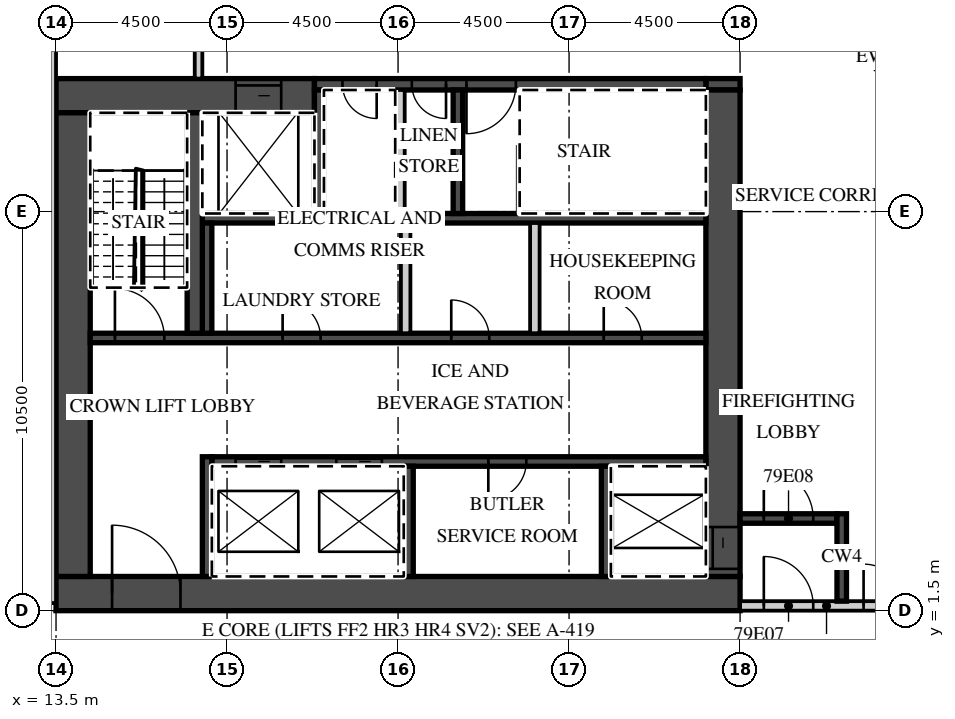
"""IFC4 building model, lengths in metres.
Left out: names, types, materials, properties, quantities, classifications, styles, units other than length and angle.
Written with IfcOpenShell. Run it as: python <this file> out.ifc"""

import sys

from ifc_helpers import new_model, si_unit, direction, frame, frame_2d, origin, place, context, subcontext, project, spatial, polyline, rectangle, outline, extrude, element, fill, save


model = new_model("IFC4")
c1 = context("Model", 3, precision=1e-05, world=origin(), true_north=direction((0.0, 1.0)))
c2 = subcontext(c1, "Body", "Model", "MODEL_VIEW")
j1 = project(units=[si_unit("LENGTHUNIT", "METRE"), si_unit("PLANEANGLEUNIT", "RADIAN")], contexts=[c1])
p1 = place(None, origin())
s1 = spatial("IfcSite", under=j1, at=p1, CompositionType="ELEMENT")
p2 = place(p1, origin())
s2 = spatial("IfcBuilding", under=s1, at=p2, CompositionType="ELEMENT")
p3 = place(p2, frame((0.0, 0.0, 313.6)))
s3 = spatial("IfcBuildingStorey", under=s2, at=p3, CompositionType="ELEMENT", Elevation=313.6)
p4 = place(p3, frame((35.805, 15.341, 0.0), z_axis=(0.0, 0.0, 1.0), x_axis=(-0.707106781187, 0.707106781187, 0.0)))
e1 = element("IfcWall", 1, at=p4, inside=s3, PredefinedType="SOLIDWALL", context=c2, shape_type="SweptSolid", body=[
    extrude(outline(polyline([(0.0, -0.225), (2.071, -0.225), (1.95, 0.225), (0.121, 0.225), (0.0, -0.225)])), origin(), (0.0, 0.0, 1.0), 3.8),
])
p5 = place(p3, frame((13.5, 1.95, 0.0), z_axis=(0.0, 0.0, 1.0), x_axis=(1.0, 0.0, 0.0)))
e2 = element("IfcWall", 2, at=p5, inside=s3, PredefinedType="SHEAR", context=c2, shape_type="SweptSolid", body=[
    extrude(rectangle(XDim=18.0, YDim=0.9, at=frame_2d((9.0, 0.0))), origin(), (0.0, 0.0, 1.0), 3.8),
])
p6 = place(p5, frame((1.475, 0.0, 0.0)))
e3 = element("IfcOpeningElement", 3, at=p6, cuts=e2, PredefinedType="OPENING", context=c2, shape_type="SweptSolid", body=[
    extrude(rectangle(XDim=1.8, YDim=2.1, at=frame_2d((0.9, 1.05))), frame((0.0, 0.46, 0.0), z_axis=(0.0, -1.0, 0.0), x_axis=(1.0, 0.0, 0.0)), (0.0, 0.0, 1.0), 0.92),
])
p7 = place(p3, frame((13.5, 15.05, 0.0), z_axis=(0.0, 0.0, 1.0), x_axis=(1.0, 0.0, 0.0)))
e4 = element("IfcWall", 4, at=p7, inside=s3, PredefinedType="SHEAR", context=c2, shape_type="SweptSolid", body=[
    extrude(rectangle(XDim=6.8, YDim=0.9, at=frame_2d((3.4, 0.0))), origin(), (0.0, 0.0, 1.0), 3.8),
])
p8 = place(p7, frame((4.725, 0.0, 0.0)))
e5 = element("IfcOpeningElement", 5, at=p8, cuts=e4, PredefinedType="OPENING", context=c2, shape_type="SweptSolid", body=[
    extrude(rectangle(XDim=1.2, YDim=2.1, at=frame_2d((0.6, 1.05))), frame((0.0, 0.46, 0.0), z_axis=(0.0, -1.0, 0.0), x_axis=(1.0, 0.0, 0.0)), (0.0, 0.0, 1.0), 0.92),
])
p9 = place(p3, frame((30.6, 15.35, 0.0), z_axis=(0.0, 0.0, 1.0), x_axis=(1.0, 0.0, 0.0)))
e6 = element("IfcWall", 6, at=p9, inside=s3, PredefinedType="SHEAR", context=c2, shape_type="SweptSolid", body=[
    extrude(rectangle(XDim=0.9, YDim=0.3, at=frame_2d((0.45, 0.0))), origin(), (0.0, 0.0, 1.0), 3.8),
])
p10 = place(p3, frame((20.3, 15.35, 0.0), z_axis=(0.0, 0.0, 1.0), x_axis=(1.0, 0.0, 0.0)))
e7 = element("IfcWall", 7, at=p10, inside=s3, PredefinedType="SHEAR", context=c2, shape_type="SweptSolid", body=[
    extrude(rectangle(XDim=10.3, YDim=0.3, at=frame_2d((5.15, 0.0))), origin(), (0.0, 0.0, 1.0), 3.8),
])
p11 = place(p10, frame((4.0, 0.0, 0.0)))
e8 = element("IfcOpeningElement", 8, at=p11, cuts=e7, PredefinedType="OPENING", context=c2, shape_type="SweptSolid", body=[
    extrude(rectangle(XDim=1.3, YDim=2.1, at=frame_2d((0.65, 1.05))), frame((0.0, 0.16, 0.0), z_axis=(0.0, -1.0, 0.0), x_axis=(1.0, 0.0, 0.0)), (0.0, 0.0, 1.0), 0.32),
])
p12 = place(p10, frame((2.562, 0.0, 0.0)))
e9 = element("IfcOpeningElement", 9, at=p12, cuts=e7, PredefinedType="OPENING", context=c2, shape_type="SweptSolid", body=[
    extrude(rectangle(XDim=0.9, YDim=2.1, at=frame_2d((0.45, 1.05))), frame((0.0, 0.16, 0.0), z_axis=(0.0, -1.0, 0.0), x_axis=(1.0, 0.0, 0.0)), (0.0, 0.0, 1.0), 0.32),
])
p13 = place(p10, frame((0.738, 0.0, 0.0)))
e10 = element("IfcOpeningElement", 10, at=p13, cuts=e7, PredefinedType="OPENING", context=c2, shape_type="SweptSolid", body=[
    extrude(rectangle(XDim=0.9, YDim=2.1, at=frame_2d((0.45, 1.05))), frame((0.0, 0.16, 0.0), z_axis=(0.0, -1.0, 0.0), x_axis=(1.0, 0.0, 0.0)), (0.0, 0.0, 1.0), 0.32),
])
p14 = place(p3, frame((31.05, 2.4, 0.0), z_axis=(0.0, 0.0, 1.0), x_axis=(0.0, 1.0, 0.0)))
e11 = element("IfcWall", 11, at=p14, inside=s3, PredefinedType="SHEAR", context=c2, shape_type="SweptSolid", body=[
    extrude(rectangle(XDim=12.8, YDim=0.9, at=frame_2d((6.4, 0.0))), origin(), (0.0, 0.0, 1.0), 3.8),
])
p15 = place(p14, frame((0.2, 0.0, 0.0)))
e12 = element("IfcOpeningElement", 12, at=p15, cuts=e11, PredefinedType="OPENING", context=c2, shape_type="SweptSolid", body=[
    extrude(rectangle(XDim=1.1, YDim=2.1, at=frame_2d((0.55, 1.05))), frame((0.0, 0.46, 0.0), z_axis=(0.0, -1.0, 0.0), x_axis=(1.0, 0.0, 0.0)), (0.0, 0.0, 1.0), 0.92),
])
p16 = place(p3, frame((13.95, 2.4, 0.0), z_axis=(0.0, 0.0, 1.0), x_axis=(0.0, 1.0, 0.0)))
e13 = element("IfcWall", 13, at=p16, inside=s3, PredefinedType="SHEAR", context=c2, shape_type="SweptSolid", body=[
    extrude(rectangle(XDim=12.2, YDim=0.9, at=frame_2d((6.1, 0.0))), origin(), (0.0, 0.0, 1.0), 3.8),
])
p17 = place(p3, frame((17.6, 5.425, 0.0), z_axis=(0.0, 0.0, 1.0), x_axis=(1.0, 0.0, 0.0)))
e14 = element("IfcWall", 14, at=p17, inside=s3, PredefinedType="SHEAR", context=c2, shape_type="SweptSolid", body=[
    extrude(rectangle(XDim=13.0, YDim=0.25, at=frame_2d((6.5, 0.0))), origin(), (0.0, 0.0, 1.0), 3.8),
])
p18 = place(p17, frame((3.275, 0.0, 0.0)))
e15 = element("IfcOpeningElement", 15, at=p18, cuts=e14, PredefinedType="OPENING", context=c2, shape_type="SweptSolid", body=[
    extrude(rectangle(XDim=1.2, YDim=2.1, at=frame_2d((0.6, 1.05))), frame((0.0, 0.135, 0.0), z_axis=(0.0, -1.0, 0.0), x_axis=(1.0, 0.0, 0.0)), (0.0, 0.0, 1.0), 0.27),
])
p19 = place(p17, frame((0.625, 0.0, 0.0)))
e16 = element("IfcOpeningElement", 16, at=p19, cuts=e14, PredefinedType="OPENING", context=c2, shape_type="SweptSolid", body=[
    extrude(rectangle(XDim=1.2, YDim=2.1, at=frame_2d((0.6, 1.05))), frame((0.0, 0.135, 0.0), z_axis=(0.0, -1.0, 0.0), x_axis=(1.0, 0.0, 0.0)), (0.0, 0.0, 1.0), 0.27),
])
p20 = place(p17, frame((7.275, 0.0, 0.0)))
e17 = element("IfcOpeningElement", 17, at=p20, cuts=e14, PredefinedType="OPENING", context=c2, shape_type="SweptSolid", body=[
    extrude(rectangle(XDim=1.0, YDim=2.1, at=frame_2d((0.5, 1.05))), frame((0.0, 0.135, 0.0), z_axis=(0.0, -1.0, 0.0), x_axis=(1.0, 0.0, 0.0)), (0.0, 0.0, 1.0), 0.27),
])
p21 = place(p3, frame((17.475, 2.4, 0.0), z_axis=(0.0, 0.0, 1.0), x_axis=(0.0, 1.0, 0.0)))
e18 = element("IfcWall", 18, at=p21, inside=s3, PredefinedType="SHEAR", context=c2, shape_type="SweptSolid", body=[
    extrude(rectangle(XDim=3.15, YDim=0.25, at=frame_2d((1.575, 0.0))), origin(), (0.0, 0.0, 1.0), 3.8),
])
for number, where, z_axis, x_axis in (
    (19, (27.975, 2.4, 0.0), (0.0, 0.0, 1.0), (0.0, 1.0, 0.0)),
    (20, (22.775, 2.4, 0.0), (0.0, 0.0, 1.0), (0.0, 1.0, 0.0)),
):
    element("IfcWall", number, at=place(p3, frame(where, z_axis=z_axis, x_axis=x_axis)), inside=s3, PredefinedType="SHEAR", context=c2, shape_type="SweptSolid", body=[
        extrude(rectangle(XDim=2.9, YDim=0.25, at=frame_2d((1.45, 0.0))), origin(), (0.0, 0.0, 1.0), 3.8),
    ])
p22 = place(p3, frame((14.4, 8.675, 0.0), z_axis=(0.0, 0.0, 1.0), x_axis=(1.0, 0.0, 0.0)))
e21 = element("IfcWall", 21, at=p22, inside=s3, PredefinedType="SHEAR", context=c2, shape_type="SweptSolid", body=[
    extrude(rectangle(XDim=16.2, YDim=0.25, at=frame_2d((8.1, 0.0))), origin(), (0.0, 0.0, 1.0), 3.8),
])
p23 = place(p22, frame((0.65, 0.0, 0.0)))
e22 = element("IfcOpeningElement", 22, at=p23, cuts=e21, PredefinedType="OPENING", context=c2, shape_type="SweptSolid", body=[
    extrude(rectangle(XDim=1.3, YDim=2.1, at=frame_2d((0.65, 1.05))), frame((0.0, 0.135, 0.0), z_axis=(0.0, -1.0, 0.0), x_axis=(1.0, 0.0, 0.0)), (0.0, 0.0, 1.0), 0.27),
])
p24 = place(p22, frame((13.512, 0.0, 0.0)))
e23 = element("IfcOpeningElement", 23, at=p24, cuts=e21, PredefinedType="OPENING", context=c2, shape_type="SweptSolid", body=[
    extrude(rectangle(XDim=1.0, YDim=2.1, at=frame_2d((0.5, 1.05))), frame((0.0, 0.135, 0.0), z_axis=(0.0, -1.0, 0.0), x_axis=(1.0, 0.0, 0.0)), (0.0, 0.0, 1.0), 0.27),
])
p25 = place(p22, frame((9.5, 0.0, 0.0)))
e24 = element("IfcOpeningElement", 24, at=p25, cuts=e21, PredefinedType="OPENING", context=c2, shape_type="SweptSolid", body=[
    extrude(rectangle(XDim=1.0, YDim=2.1, at=frame_2d((0.5, 1.05))), frame((0.0, 0.135, 0.0), z_axis=(0.0, -1.0, 0.0), x_axis=(1.0, 0.0, 0.0)), (0.0, 0.0, 1.0), 0.27),
])
p26 = place(p22, frame((5.062, 0.0, 0.0)))
e25 = element("IfcOpeningElement", 25, at=p26, cuts=e21, PredefinedType="OPENING", context=c2, shape_type="SweptSolid", body=[
    extrude(rectangle(XDim=1.0, YDim=2.1, at=frame_2d((0.5, 1.05))), frame((0.0, 0.135, 0.0), z_axis=(0.0, -1.0, 0.0), x_axis=(1.0, 0.0, 0.0)), (0.0, 0.0, 1.0), 0.27),
])
p27 = place(p3, frame((17.35, 11.825, 0.0), z_axis=(0.0, 0.0, 1.0), x_axis=(1.0, 0.0, 0.0)))
e26 = element("IfcWall", 26, at=p27, inside=s3, PredefinedType="SHEAR", context=c2, shape_type="SweptSolid", body=[
    extrude(rectangle(XDim=13.25, YDim=0.25, at=frame_2d((6.625, 0.0))), origin(), (0.0, 0.0, 1.0), 3.8),
])
p28 = place(p3, frame((17.475, 8.8, 0.0), z_axis=(0.0, 0.0, 1.0), x_axis=(0.0, 1.0, 0.0)))
e27 = element("IfcWall", 27, at=p28, inside=s3, PredefinedType="SHEAR", context=c2, shape_type="SweptSolid", body=[
    extrude(rectangle(XDim=2.9, YDim=0.25, at=frame_2d((1.45, 0.0))), origin(), (0.0, 0.0, 1.0), 3.8),
])
for number, where, z_axis, x_axis in (
    (28, (26.1, 8.8, 0.0), (0.0, 0.0, 1.0), (0.0, 1.0, 0.0)),
    (29, (22.7, 8.8, 0.0), (0.0, 0.0, 1.0), (0.0, 1.0, 0.0)),
):
    element("IfcWall", number, at=place(p3, frame(where, z_axis=z_axis, x_axis=x_axis)), inside=s3, PredefinedType="PARTITIONING", context=c2, shape_type="SweptSolid", body=[
        extrude(rectangle(XDim=2.9, YDim=0.25, at=frame_2d((1.45, 0.0))), origin(), (0.0, 0.0, 1.0), 3.8),
    ])
p29 = place(p3, frame((17.15, 8.8, 0.0), z_axis=(0.0, 0.0, 1.0), x_axis=(0.0, 1.0, 0.0)))
e30 = element("IfcWall", 30, at=p29, inside=s3, PredefinedType="SHEAR", context=c2, shape_type="SweptSolid", body=[
    extrude(rectangle(XDim=5.8, YDim=0.4, at=frame_2d((2.9, 0.0))), origin(), (0.0, 0.0, 1.0), 3.8),
])
for number, where, z_axis, x_axis in (
    (31, (20.425, 11.95, 0.0), (0.0, 0.0, 1.0), (0.0, 1.0, 0.0)),
    (32, (24.075, 11.95, 0.0), (0.0, 0.0, 1.0), (0.0, 1.0, 0.0)),
):
    element("IfcWall", number, at=place(p3, frame(where, z_axis=z_axis, x_axis=x_axis)), inside=s3, PredefinedType="SHEAR", context=c2, shape_type="SweptSolid", body=[
        extrude(rectangle(XDim=3.25, YDim=0.25, at=frame_2d((1.625, 0.0))), origin(), (0.0, 0.0, 1.0), 3.8),
    ])
p30 = place(p3, frame((22.55, 11.95, 0.0), z_axis=(0.0, 0.0, 1.0), x_axis=(0.0, 1.0, 0.0)))
e33 = element("IfcWall", 33, at=p30, inside=s3, PredefinedType="PARTITIONING", context=c2, shape_type="SweptSolid", body=[
    extrude(rectangle(XDim=3.25, YDim=0.25, at=frame_2d((1.625, 0.0))), origin(), (0.0, 0.0, 1.0), 3.8),
])
p31 = place(p3, frame((31.5, 1.625, 0.0), z_axis=(0.0, 0.0, 1.0), x_axis=(1.0, 0.0, 0.0)))
e34 = element("IfcWall", 34, at=p31, inside=s3, PredefinedType="PARTITIONING", context=c2, shape_type="SweptSolid", body=[
    extrude(rectangle(XDim=4.55, YDim=0.25, at=frame_2d((2.275, 0.0))), origin(), (0.0, 0.0, 1.0), 3.8),
])
p32 = place(p31, frame((0.625, 0.0, 0.0)))
e35 = element("IfcOpeningElement", 35, at=p32, cuts=e34, PredefinedType="OPENING", context=c2, shape_type="SweptSolid", body=[
    extrude(rectangle(XDim=1.3, YDim=2.1, at=frame_2d((0.65, 1.05))), frame((0.0, 0.135, 0.0), z_axis=(0.0, -1.0, 0.0), x_axis=(1.0, 0.0, 0.0)), (0.0, 0.0, 1.0), 0.27),
])
p33 = place(p31, frame((3.25, 0.0, 0.0)))
e36 = element("IfcOpeningElement", 36, at=p33, cuts=e34, PredefinedType="OPENING", context=c2, shape_type="SweptSolid", body=[
    extrude(rectangle(XDim=1.1, YDim=2.1, at=frame_2d((0.55, 1.05))), frame((0.0, 0.135, 0.0), z_axis=(0.0, -1.0, 0.0), x_axis=(1.0, 0.0, 0.0)), (0.0, 0.0, 1.0), 0.27),
])
p34 = place(p3, frame((31.5, 3.925, 0.0), z_axis=(0.0, 0.0, 1.0), x_axis=(1.0, 0.0, 0.0)))
e37 = element("IfcWall", 37, at=p34, inside=s3, PredefinedType="SHEAR", context=c2, shape_type="SweptSolid", body=[
    extrude(rectangle(XDim=2.55, YDim=0.25, at=frame_2d((1.275, 0.0))), origin(), (0.0, 0.0, 1.0), 3.8),
])
p35 = place(p34, frame((0.625, 0.0, 0.0)))
e38 = element("IfcOpeningElement", 38, at=p35, cuts=e37, PredefinedType="OPENING", context=c2, shape_type="SweptSolid", body=[
    extrude(rectangle(XDim=1.3, YDim=2.1, at=frame_2d((0.65, 1.05))), frame((0.0, 0.135, 0.0), z_axis=(0.0, -1.0, 0.0), x_axis=(1.0, 0.0, 0.0)), (0.0, 0.0, 1.0), 0.27),
])
p36 = place(p3, frame((34.175, 1.75, 0.0), z_axis=(0.0, 0.0, 1.0), x_axis=(0.0, 1.0, 0.0)))
e39 = element("IfcWall", 39, at=p36, inside=s3, PredefinedType="SHEAR", context=c2, shape_type="SweptSolid", body=[
    extrude(rectangle(XDim=2.3, YDim=0.25, at=frame_2d((1.15, 0.0))), origin(), (0.0, 0.0, 1.0), 3.8),
])
p37 = place(p3, frame((17.25, 15.5, 0.0), z_axis=(0.0, 0.0, 1.0), x_axis=(0.0, 1.0, 0.0)))
e40 = element("IfcWall", 40, at=p37, inside=s3, PredefinedType="PARTITIONING", context=c2, shape_type="SweptSolid", body=[
    extrude(rectangle(XDim=2.2, YDim=0.2, at=frame_2d((1.1, 0.0))), origin(), (0.0, 0.0, 1.0), 3.8),
])
p38 = place(p3, frame((13.4, 1.7, 0.0), z_axis=(0.0, 0.0, 1.0), x_axis=(0.0, 1.0, 0.0)))
e41 = element("IfcWall", 41, at=p38, inside=s3, PredefinedType="PARTITIONING", context=c2, shape_type="SweptSolid", body=[
    extrude(rectangle(XDim=15.35, YDim=0.2, at=frame_2d((7.675, 0.0))), origin(), (0.0, 0.0, 1.0), 3.8),
])
p39 = place(p18, origin())
e42 = element("IfcDoor", 42, at=p39, inside=s3, OperationType="SLIDING_TO_RIGHT", PredefinedType="DOOR", context=c2, shape_type="SweptSolid", body=[
    extrude(rectangle(XDim=1.2, YDim=2.1, at=frame_2d((0.6, 1.05))), frame((0.0, 0.025, 0.0), z_axis=(0.0, -1.0, 0.0), x_axis=(1.0, 0.0, 0.0)), (0.0, 0.0, 1.0), 0.05),
])
fill(e15, e42)
p40 = place(p19, origin())
e43 = element("IfcDoor", 43, at=p40, inside=s3, OperationType="SLIDING_TO_LEFT", PredefinedType="DOOR", context=c2, shape_type="SweptSolid", body=[
    extrude(rectangle(XDim=1.2, YDim=2.1, at=frame_2d((0.6, 1.05))), frame((0.0, 0.025, 0.0), z_axis=(0.0, -1.0, 0.0), x_axis=(1.0, 0.0, 0.0)), (0.0, 0.0, 1.0), 0.05),
])
fill(e16, e43)
p41 = place(p8, origin())
e44 = element("IfcDoor", 44, at=p41, inside=s3, OperationType="SLIDING_TO_LEFT", PredefinedType="DOOR", context=c2, shape_type="SweptSolid", body=[
    extrude(rectangle(XDim=1.2, YDim=2.1, at=frame_2d((0.6, 1.05))), frame((0.0, 0.025, 0.0), z_axis=(0.0, -1.0, 0.0), x_axis=(1.0, 0.0, 0.0)), (0.0, 0.0, 1.0), 0.05),
])
fill(e5, e44)
p42 = place(p15, origin())
e45 = element("IfcDoor", 45, at=p42, inside=s3, OperationType="SLIDING_TO_LEFT", PredefinedType="DOOR", context=c2, shape_type="SweptSolid", body=[
    extrude(rectangle(XDim=1.1, YDim=2.1, at=frame_2d((0.55, 1.05))), frame((0.0, 0.025, 0.0), z_axis=(0.0, -1.0, 0.0), x_axis=(1.0, 0.0, 0.0)), (0.0, 0.0, 1.0), 0.05),
])
fill(e12, e45)
p43 = place(p6, origin())
e46 = element("IfcDoor", 46, at=p43, inside=s3, OperationType="DOUBLE_DOOR_DOUBLE_SWING", PredefinedType="DOOR", context=c2, shape_type="SweptSolid", body=[
    extrude(rectangle(XDim=1.8, YDim=2.1, at=frame_2d((0.9, 1.05))), frame((0.0, 0.025, 0.0), z_axis=(0.0, -1.0, 0.0), x_axis=(1.0, 0.0, 0.0)), (0.0, 0.0, 1.0), 0.05),
])
fill(e3, e46)
p44 = place(p32, origin())
e47 = element("IfcDoor", 47, at=p44, inside=s3, OperationType="SINGLE_SWING_LEFT", PredefinedType="DOOR", context=c2, shape_type="SweptSolid", body=[
    extrude(rectangle(XDim=1.3, YDim=2.1, at=frame_2d((0.65, 1.05))), frame((0.0, 0.025, 0.0), z_axis=(0.0, -1.0, 0.0), x_axis=(1.0, 0.0, 0.0)), (0.0, 0.0, 1.0), 0.05),
])
fill(e35, e47)
p45 = place(p35, origin())
e48 = element("IfcDoor", 48, at=p45, inside=s3, OperationType="SINGLE_SWING_LEFT", PredefinedType="DOOR", context=c2, shape_type="SweptSolid", body=[
    extrude(rectangle(XDim=1.3, YDim=2.1, at=frame_2d((0.65, 1.05))), frame((0.0, 0.025, 0.0), z_axis=(0.0, -1.0, 0.0), x_axis=(1.0, 0.0, 0.0)), (0.0, 0.0, 1.0), 0.05),
])
fill(e38, e48)
p46 = place(p33, origin())
e49 = element("IfcDoor", 49, at=p46, inside=s3, OperationType="SINGLE_SWING_LEFT", PredefinedType="DOOR", context=c2, shape_type="SweptSolid", body=[
    extrude(rectangle(XDim=1.1, YDim=2.1, at=frame_2d((0.55, 1.05))), frame((0.0, 0.025, 0.0), z_axis=(0.0, -1.0, 0.0), x_axis=(1.0, 0.0, 0.0)), (0.0, 0.0, 1.0), 0.05),
])
fill(e36, e49)
p47 = place(p23, origin())
e50 = element("IfcDoor", 50, at=p47, inside=s3, OperationType="SINGLE_SWING_LEFT", PredefinedType="DOOR", context=c2, shape_type="SweptSolid", body=[
    extrude(rectangle(XDim=1.3, YDim=2.1, at=frame_2d((0.65, 1.05))), frame((0.0, 0.025, 0.0), z_axis=(0.0, -1.0, 0.0), x_axis=(1.0, 0.0, 0.0)), (0.0, 0.0, 1.0), 0.05),
])
fill(e22, e50)
p48 = place(p11, origin())
e51 = element("IfcDoor", 51, at=p48, inside=s3, OperationType="SINGLE_SWING_LEFT", PredefinedType="DOOR", context=c2, shape_type="SweptSolid", body=[
    extrude(rectangle(XDim=1.3, YDim=2.1, at=frame_2d((0.65, 1.05))), frame((0.0, 0.025, 0.0), z_axis=(0.0, -1.0, 0.0), x_axis=(1.0, 0.0, 0.0)), (0.0, 0.0, 1.0), 0.05),
])
fill(e8, e51)
p49 = place(p12, origin())
e52 = element("IfcDoor", 52, at=p49, inside=s3, OperationType="SINGLE_SWING_RIGHT", PredefinedType="DOOR", context=c2, shape_type="SweptSolid", body=[
    extrude(rectangle(XDim=0.9, YDim=2.1, at=frame_2d((0.45, 1.05))), frame((0.0, 0.025, 0.0), z_axis=(0.0, -1.0, 0.0), x_axis=(1.0, 0.0, 0.0)), (0.0, 0.0, 1.0), 0.05),
])
fill(e9, e52)
p50 = place(p13, origin())
e53 = element("IfcDoor", 53, at=p50, inside=s3, OperationType="SINGLE_SWING_RIGHT", PredefinedType="DOOR", context=c2, shape_type="SweptSolid", body=[
    extrude(rectangle(XDim=0.9, YDim=2.1, at=frame_2d((0.45, 1.05))), frame((0.0, 0.025, 0.0), z_axis=(0.0, -1.0, 0.0), x_axis=(1.0, 0.0, 0.0)), (0.0, 0.0, 1.0), 0.05),
])
fill(e10, e53)
p51 = place(p24, origin())
e54 = element("IfcDoor", 54, at=p51, inside=s3, OperationType="SINGLE_SWING_LEFT", PredefinedType="DOOR", context=c2, shape_type="SweptSolid", body=[
    extrude(rectangle(XDim=1.0, YDim=2.1, at=frame_2d((0.5, 1.05))), frame((0.0, 0.025, 0.0), z_axis=(0.0, -1.0, 0.0), x_axis=(1.0, 0.0, 0.0)), (0.0, 0.0, 1.0), 0.05),
])
fill(e23, e54)
p52 = place(p25, origin())
e55 = element("IfcDoor", 55, at=p52, inside=s3, OperationType="SINGLE_SWING_LEFT", PredefinedType="DOOR", context=c2, shape_type="SweptSolid", body=[
    extrude(rectangle(XDim=1.0, YDim=2.1, at=frame_2d((0.5, 1.05))), frame((0.0, 0.025, 0.0), z_axis=(0.0, -1.0, 0.0), x_axis=(1.0, 0.0, 0.0)), (0.0, 0.0, 1.0), 0.05),
])
fill(e24, e55)
p53 = place(p26, origin())
e56 = element("IfcDoor", 56, at=p53, inside=s3, OperationType="SINGLE_SWING_LEFT", PredefinedType="DOOR", context=c2, shape_type="SweptSolid", body=[
    extrude(rectangle(XDim=1.0, YDim=2.1, at=frame_2d((0.5, 1.05))), frame((0.0, 0.025, 0.0), z_axis=(0.0, -1.0, 0.0), x_axis=(1.0, 0.0, 0.0)), (0.0, 0.0, 1.0), 0.05),
])
fill(e25, e56)
p54 = place(p20, origin())
e57 = element("IfcDoor", 57, at=p54, inside=s3, OperationType="SINGLE_SWING_LEFT", PredefinedType="DOOR", context=c2, shape_type="SweptSolid", body=[
    extrude(rectangle(XDim=1.0, YDim=2.1, at=frame_2d((0.5, 1.05))), frame((0.0, 0.025, 0.0), z_axis=(0.0, -1.0, 0.0), x_axis=(1.0, 0.0, 0.0)), (0.0, 0.0, 1.0), 0.05),
])
fill(e17, e57)
save(model, sys.argv[1])
